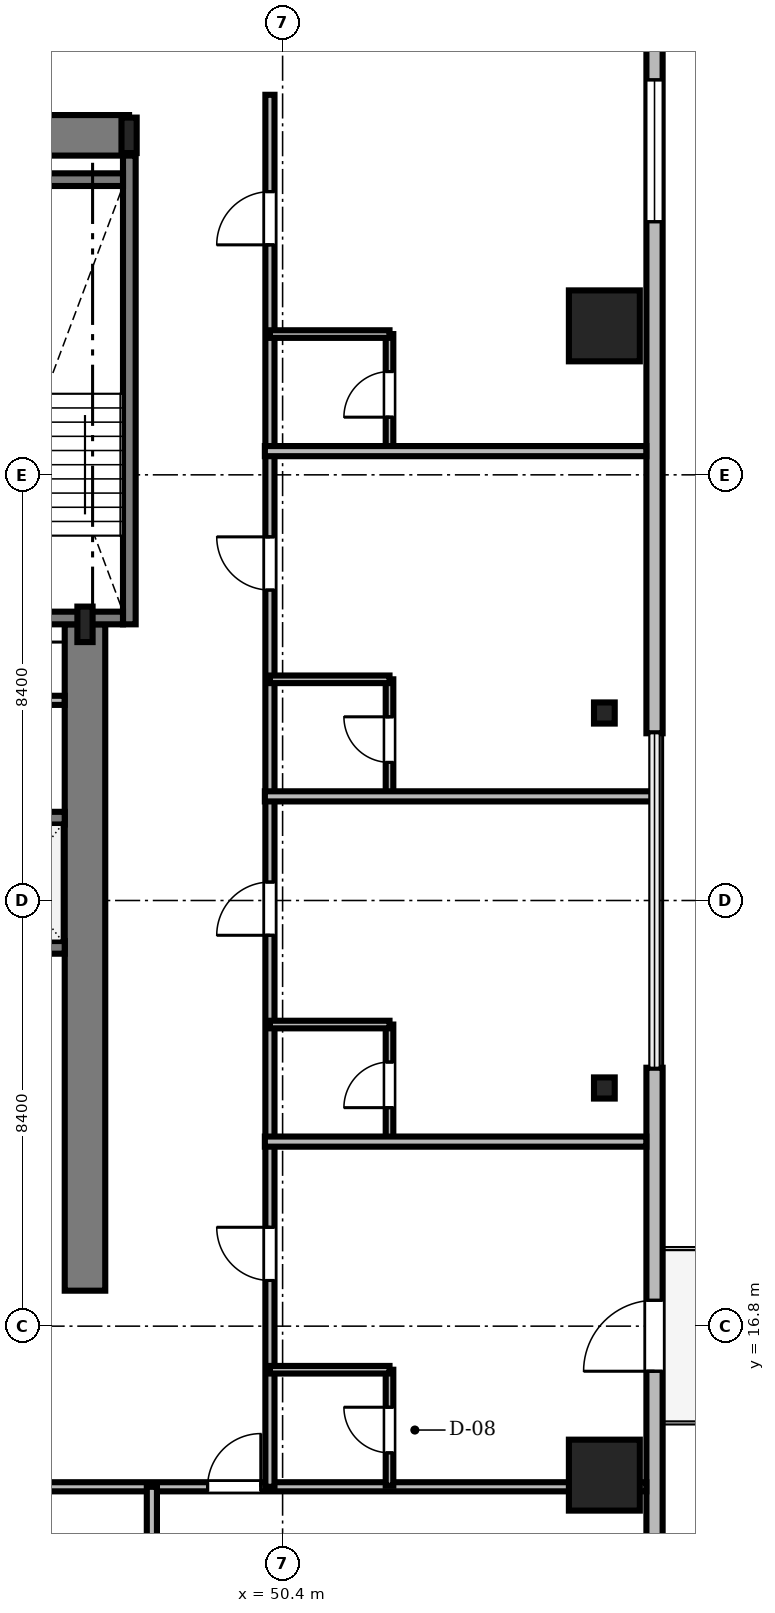
"""IFC4 building model, lengths in metres.
Left out: names, types, materials, properties, quantities, classifications, styles, units other than length and angle.
Written with IfcOpenShell. Run it as: python <this file> out.ifc"""

import sys

from ifc_helpers import new_model, si_unit, direction, frame, frame_2d, origin, origin_2d, place, context, subcontext, project, spatial, rectangle, i_section, extrude, source, transform, mapped, element, fill, save


model = new_model("IFC4")
c1 = context("Model", 3, precision=1e-05, world=origin(), true_north=direction((0.0, 1.0)))
c2 = subcontext(c1, "Body", "Model", "MODEL_VIEW")
j1 = project(units=[si_unit("LENGTHUNIT", "METRE"), si_unit("PLANEANGLEUNIT", "RADIAN")], contexts=[c1])
p1 = place(None, origin())
s1 = spatial("IfcSite", under=j1, at=p1, CompositionType="ELEMENT")
p2 = place(p1, origin())
s2 = spatial("IfcBuilding", under=s1, at=p2, CompositionType="ELEMENT")
p3 = place(p2, frame((0.0, 0.0, 226.05)))
s3 = spatial("IfcBuildingStorey", under=s2, at=p3, CompositionType="ELEMENT", Elevation=226.05)
m1 = source(origin(), c2, "Body", "SweptSolid", [
    extrude(rectangle(XDim=17.52, YDim=0.8, at=frame_2d((8.76, 0.0))), origin(), (0.0, 0.0, 1.0), 3.53),
])
p4 = place(p3, frame((29.85, 40.3, 0.0), z_axis=(0.0, 0.0, 1.0), x_axis=(1.0, 0.0, 0.0)))
e1 = element("IfcWall", 1, at=p4, inside=s3, PredefinedType="SHEAR", context=c2, shape_type="MappedRepresentation", body=[
    mapped(m1, transform((0.0, 0.0, 0.0), scale=1.0)),
])
m2 = source(origin(), c2, "Body", "SweptSolid", [
    extrude(rectangle(XDim=13.15, YDim=0.8, at=frame_2d((6.575, 0.0))), origin(), (0.0, 0.0, 1.0), 3.53),
])
p5 = place(p3, frame((46.5, 17.5, 0.0), z_axis=(0.0, 0.0, 1.0), x_axis=(0.0, 1.0, 0.0)))
e2 = element("IfcWall", 2, at=p5, inside=s3, PredefinedType="SHEAR", context=c2, shape_type="MappedRepresentation", body=[
    mapped(m2, transform((0.0, 0.0, 0.0), scale=1.0)),
])
m3 = source(origin(), c2, "Body", "SweptSolid", [
    extrude(i_section(OverallWidth=0.3, OverallDepth=0.7, WebThickness=0.017, FlangeThickness=0.032, FilletRadius=0.027, at=origin_2d()), origin(), (0.0, 0.0, 1.0), 3.53),
])
for number, where, z_axis, x_axis in (
    (3, (46.5, 30.65, 0.0), (0.0, 0.0, 1.0), (1.0, 0.0, 0.0)),
    (4, (47.37, 40.3, 0.0), (0.0, 0.0, 1.0), (1.0, 0.0, 0.0)),
):
    element("IfcColumn", number, at=place(p3, frame(where, z_axis=z_axis, x_axis=x_axis)), inside=s3, PredefinedType="COLUMN", context=c2, shape_type="MappedRepresentation", body=[
        mapped(m3, transform((0.0, 0.0, 0.0), scale=1.0)),
    ])
m4 = source(origin(), c2, "Body", "SweptSolid", [
    extrude(rectangle(XDim=1.4, YDim=1.4, at=origin_2d()), origin(), (0.0, 0.0, 1.0), 3.53),
])
for number, where, z_axis, x_axis in (
    (5, (56.75, 13.86, 0.0), (0.0, 0.0, 1.0), (1.0, 0.0, 0.0)),
    (6, (56.75, 36.54, 0.0), (0.0, 0.0, 1.0), (1.0, 0.0, 0.0)),
):
    element("IfcColumn", number, at=place(p3, frame(where, z_axis=z_axis, x_axis=x_axis)), inside=s3, PredefinedType="COLUMN", context=c2, shape_type="MappedRepresentation", body=[
        mapped(m4, transform((0.0, 0.0, 0.0), scale=1.0)),
    ])
m5 = source(origin(), c2, "Body", "SweptSolid", [
    extrude(i_section(OverallWidth=0.409, OverallDepth=0.417, WebThickness=0.021, FlangeThickness=0.033, FilletRadius=0.015, at=origin_2d()), origin(), (0.0, 0.0, 1.0), 3.53),
])
for number, where, z_axis, x_axis in (
    (7, (56.75, 21.5, 0.0), (0.0, 0.0, 1.0), (1.0, 0.0, 0.0)),
    (8, (56.75, 28.9, 0.0), (0.0, 0.0, 1.0), (1.0, 0.0, 0.0)),
):
    element("IfcColumn", number, at=place(p3, frame(where, z_axis=z_axis, x_axis=x_axis)), inside=s3, PredefinedType="COLUMN", context=c2, shape_type="MappedRepresentation", body=[
        mapped(m5, transform((0.0, 0.0, 0.0), scale=1.0)),
    ])
m6 = source(origin(), c2, "Body", "SweptSolid", [
    extrude(rectangle(XDim=15.6, YDim=0.32, at=frame_2d((7.8, 0.0))), origin(), (0.0, 0.0, 1.0), 3.53),
])
p6 = place(p3, frame((57.74, 6.3, 0.0), z_axis=(0.0, 0.0, 1.0), x_axis=(0.0, 1.0, 0.0)))
e9 = element("IfcWall", 9, at=p6, inside=s3, PredefinedType="SOLIDWALL", context=c2, shape_type="MappedRepresentation", body=[
    mapped(m6, transform((0.0, 0.0, 0.0), scale=1.0)),
])
m7 = source(origin(), c2, "Body", "SweptSolid", [
    extrude(rectangle(XDim=1.4, YDim=2.3, at=frame_2d((0.7, 1.15))), frame((0.0, 0.17, 0.0), z_axis=(0.0, -1.0, 0.0), x_axis=(1.0, 0.0, 0.0)), (0.0, 0.0, 1.0), 0.34),
])
p7 = place(p6, frame((9.61, 0.0, 0.0)))
e10 = element("IfcOpeningElement", 10, at=p7, cuts=e9, PredefinedType="OPENING", context=c2, shape_type="MappedRepresentation", body=[
    mapped(m7, transform((0.0, 0.0, 0.0), scale=1.0)),
])
m8 = source(origin(), c2, "Body", "SweptSolid", [
    extrude(rectangle(XDim=2.8, YDim=2.4, at=frame_2d((1.4, 1.2))), frame((0.0, 0.17, 0.0), z_axis=(0.0, -1.0, 0.0), x_axis=(1.0, 0.0, 0.0)), (0.0, 0.0, 1.0), 0.34),
])
p8 = place(p6, frame((2.705, 0.0, 0.72)))
e11 = element("IfcOpeningElement", 11, at=p8, cuts=e9, PredefinedType="OPENING", context=c2, shape_type="MappedRepresentation", body=[
    mapped(m8, transform((0.0, 0.0, 0.0), scale=1.0)),
])
m9 = source(origin(), c2, "Body", "SweptSolid", [
    extrude(rectangle(XDim=15.6, YDim=0.32, at=frame_2d((7.8, 0.0))), origin(), (0.0, 0.0, 1.0), 3.53),
])
p9 = place(p3, frame((57.74, 28.5, 0.0), z_axis=(0.0, 0.0, 1.0), x_axis=(0.0, 1.0, 0.0)))
e12 = element("IfcWall", 12, at=p9, inside=s3, PredefinedType="SOLIDWALL", context=c2, shape_type="MappedRepresentation", body=[
    mapped(m9, transform((0.0, 0.0, 0.0), scale=1.0)),
])
p10 = place(p9, frame((10.095, 0.0, 0.72)))
e13 = element("IfcOpeningElement", 13, at=p10, cuts=e12, PredefinedType="OPENING", context=c2, shape_type="MappedRepresentation", body=[
    mapped(m8, transform((0.0, 0.0, 0.0), scale=1.0)),
])
m10 = source(origin(), c2, "Body", "SweptSolid", [
    extrude(rectangle(XDim=9.25, YDim=0.25, at=frame_2d((4.625, 0.0))), origin(), (0.0, 0.0, 1.0), 3.55),
])
p11 = place(p3, frame((47.375, 30.65, 0.0), z_axis=(0.0, 0.0, 1.0), x_axis=(0.0, 1.0, 0.0)))
e14 = element("IfcWall", 14, at=p11, inside=s3, PredefinedType="SOLIDWALL", context=c2, shape_type="MappedRepresentation", body=[
    mapped(m10, transform((0.0, 0.0, 0.0), scale=1.0)),
])
m11 = source(origin(), c2, "Body", "SweptSolid", [
    extrude(rectangle(XDim=3.15, YDim=0.25, at=frame_2d((1.575, 0.0))), origin(), (0.0, 0.0, 1.0), 3.55),
])
p12 = place(p3, frame((44.1, 39.425, 0.0), z_axis=(0.0, 0.0, 1.0), x_axis=(1.0, 0.0, 0.0)))
e15 = element("IfcWall", 15, at=p12, inside=s3, PredefinedType="SOLIDWALL", context=c2, shape_type="MappedRepresentation", body=[
    mapped(m11, transform((0.0, 0.0, 0.0), scale=1.0)),
])
p13 = place(p3, frame((44.1, 30.775, 0.0), z_axis=(0.0, 0.0, 1.0), x_axis=(1.0, 0.0, 0.0)))
e16 = element("IfcWall", 16, at=p13, inside=s3, PredefinedType="SOLIDWALL", context=c2, shape_type="MappedRepresentation", body=[
    mapped(m11, transform((0.0, 0.0, 0.0), scale=1.0)),
])
m12 = source(origin(), c2, "Body", "SweptSolid", [
    extrude(rectangle(XDim=1.1, YDim=2.2, at=frame_2d((0.55, 1.1))), frame((0.0, 0.135, 0.0), z_axis=(0.0, -1.0, 0.0), x_axis=(1.0, 0.0, 0.0)), (0.0, 0.0, 1.0), 0.27),
])
p14 = place(p13, frame((0.35, 0.0, 0.0)))
e17 = element("IfcOpeningElement", 17, at=p14, cuts=e16, PredefinedType="OPENING", context=c2, shape_type="MappedRepresentation", body=[
    mapped(m12, transform((0.0, 0.0, 0.0), scale=1.0)),
])
m13 = source(origin(), c2, "Body", "SweptSolid", [
    extrude(rectangle(XDim=2.1, YDim=0.25, at=frame_2d((1.05, 0.0))), origin(), (0.0, 0.0, 1.0), 3.53),
])
p15 = place(p3, frame((44.0, 24.275, 0.0), z_axis=(0.0, 0.0, 1.0), x_axis=(1.0, 0.0, 0.0)))
e18 = element("IfcWall", 18, at=p15, inside=s3, PredefinedType="SOLIDWALL", context=c2, shape_type="MappedRepresentation", body=[
    mapped(m13, transform((0.0, 0.0, 0.0), scale=1.0)),
])
p16 = place(p3, frame((44.0, 26.825, 0.0), z_axis=(0.0, 0.0, 1.0), x_axis=(1.0, 0.0, 0.0)))
e19 = element("IfcWall", 19, at=p16, inside=s3, PredefinedType="SOLIDWALL", context=c2, shape_type="MappedRepresentation", body=[
    mapped(m13, transform((0.0, 0.0, 0.0), scale=1.0)),
])
m14 = source(origin(), c2, "Body", "SweptSolid", [
    extrude(rectangle(XDim=1.3, YDim=2.3, at=frame_2d((0.65, 1.15))), frame((0.0, 0.135, 0.0), z_axis=(0.0, -1.0, 0.0), x_axis=(1.0, 0.0, 0.0)), (0.0, 0.0, 1.0), 0.27),
])
p17 = place(p16, frame((0.4, 0.0, 0.0)))
e20 = element("IfcOpeningElement", 20, at=p17, cuts=e19, PredefinedType="OPENING", context=c2, shape_type="MappedRepresentation", body=[
    mapped(m14, transform((0.0, 0.0, 0.0), scale=1.0)),
])
m15 = source(origin(), c2, "Body", "SweptSolid", [
    extrude(rectangle(XDim=46.156, YDim=0.18, at=frame_2d((23.078, 0.0))), origin(), (0.0, 0.0, 1.0), 2.772),
])
p18 = place(p3, frame((11.422, 13.63, 0.0), z_axis=(0.0, 0.0, 1.0), x_axis=(1.0, 0.0, 0.0)))
e21 = element("IfcWall", 21, at=p18, inside=s3, PredefinedType="PARTITIONING", context=c2, shape_type="MappedRepresentation", body=[
    mapped(m15, transform((0.0, 0.0, 0.0), scale=1.0)),
])
m16 = source(origin(), c2, "Body", "SweptSolid", [
    extrude(rectangle(XDim=1.05, YDim=2.2, at=frame_2d((0.525, 1.1))), frame((0.0, 0.1, 0.0), z_axis=(0.0, -1.0, 0.0), x_axis=(1.0, 0.0, 0.0)), (0.0, 0.0, 1.0), 0.2),
])
p19 = place(p18, frame((14.338, 0.0, 0.0)))
e22 = element("IfcOpeningElement", 22, at=p19, cuts=e21, PredefinedType="OPENING", context=c2, shape_type="MappedRepresentation", body=[
    mapped(m16, transform((0.0, 0.0, 0.0), scale=1.0)),
])
p20 = place(p18, frame((17.059, 0.0, 0.0)))
e23 = element("IfcOpeningElement", 23, at=p20, cuts=e21, PredefinedType="OPENING", context=c2, shape_type="MappedRepresentation", body=[
    mapped(m16, transform((0.0, 0.0, 0.0), scale=1.0)),
])
p21 = place(p18, frame((21.772, 0.0, 0.0)))
e24 = element("IfcOpeningElement", 24, at=p21, cuts=e21, PredefinedType="OPENING", context=c2, shape_type="MappedRepresentation", body=[
    mapped(m16, transform((0.0, 0.0, 0.0), scale=1.0)),
])
p22 = place(p18, frame((27.414, 0.0, 0.0)))
e25 = element("IfcOpeningElement", 25, at=p22, cuts=e21, PredefinedType="OPENING", context=c2, shape_type="MappedRepresentation", body=[
    mapped(m16, transform((0.0, 0.0, 0.0), scale=1.0)),
])
p23 = place(p18, frame((33.057, 0.0, 0.0)))
e26 = element("IfcOpeningElement", 26, at=p23, cuts=e21, PredefinedType="OPENING", context=c2, shape_type="MappedRepresentation", body=[
    mapped(m16, transform((0.0, 0.0, 0.0), scale=1.0)),
])
p24 = place(p18, frame((37.498, 0.0, 0.0)))
e27 = element("IfcOpeningElement", 27, at=p24, cuts=e21, PredefinedType="OPENING", context=c2, shape_type="MappedRepresentation", body=[
    mapped(m16, transform((0.0, 0.0, 0.0), scale=1.0)),
])
m17 = source(origin(), c2, "Body", "SweptSolid", [
    extrude(rectangle(XDim=27.47, YDim=0.18, at=frame_2d((13.735, 0.0))), origin(), (0.0, 0.0, 1.0), 2.972),
])
p25 = place(p3, frame((50.15, 13.63, 0.0), z_axis=(0.0, 0.0, 1.0), x_axis=(0.0, 1.0, 0.0)))
e28 = element("IfcWall", 28, at=p25, inside=s3, PredefinedType="PARTITIONING", context=c2, shape_type="MappedRepresentation", body=[
    mapped(m17, transform((0.0, 0.0, 0.0), scale=1.0)),
])
p26 = place(p25, frame((4.071, 0.0, 0.0)))
e29 = element("IfcOpeningElement", 29, at=p26, cuts=e28, PredefinedType="OPENING", context=c2, shape_type="MappedRepresentation", body=[
    mapped(m16, transform((0.0, 0.0, 0.0), scale=1.0)),
])
p27 = place(p25, frame((10.884, 0.0, 0.0)))
e30 = element("IfcOpeningElement", 30, at=p27, cuts=e28, PredefinedType="OPENING", context=c2, shape_type="MappedRepresentation", body=[
    mapped(m16, transform((0.0, 0.0, 0.0), scale=1.0)),
])
p28 = place(p25, frame((17.696, 0.0, 0.0)))
e31 = element("IfcOpeningElement", 31, at=p28, cuts=e28, PredefinedType="OPENING", context=c2, shape_type="MappedRepresentation", body=[
    mapped(m16, transform((0.0, 0.0, 0.0), scale=1.0)),
])
p29 = place(p25, frame((24.509, 0.0, 0.0)))
e32 = element("IfcOpeningElement", 32, at=p29, cuts=e28, PredefinedType="OPENING", context=c2, shape_type="MappedRepresentation", body=[
    mapped(m16, transform((0.0, 0.0, 0.0), scale=1.0)),
])
m18 = source(origin(), c2, "Body", "SweptSolid", [
    extrude(rectangle(XDim=4.548, YDim=0.18, at=frame_2d((2.274, 0.0))), origin(), (0.0, 0.0, 1.0), 3.162),
])
p30 = place(p3, frame((41.55, 29.15, 0.0), z_axis=(0.0, 0.0, 1.0), x_axis=(1.0, 0.0, 0.0)))
e33 = element("IfcWall", 33, at=p30, inside=s3, PredefinedType="PARTITIONING", context=c2, shape_type="MappedRepresentation", body=[
    mapped(m18, transform((0.0, 0.0, 0.0), scale=1.0)),
])
m19 = source(origin(), c2, "Body", "SweptSolid", [
    extrude(rectangle(XDim=1.2, YDim=2.2, at=frame_2d((0.6, 1.1))), frame((0.0, 0.1, 0.0), z_axis=(0.0, -1.0, 0.0), x_axis=(1.0, 0.0, 0.0)), (0.0, 0.0, 1.0), 0.2),
])
p31 = place(p30, frame((1.6, 0.0, 0.0)))
e34 = element("IfcOpeningElement", 34, at=p31, cuts=e33, PredefinedType="OPENING", context=c2, shape_type="MappedRepresentation", body=[
    mapped(m19, transform((0.0, 0.0, 0.0), scale=1.0)),
])
m20 = source(origin(), c2, "Body", "SweptSolid", [
    extrude(rectangle(XDim=2.29, YDim=0.15, at=frame_2d((1.145, 0.0))), origin(), (0.0, 0.0, 1.0), 2.972),
])
p32 = place(p3, frame((52.51, 13.65, 0.0), z_axis=(0.0, 0.0, 1.0), x_axis=(0.0, 1.0, 0.0)))
e35 = element("IfcWall", 35, at=p32, inside=s3, PredefinedType="PARTITIONING", context=c2, shape_type="MappedRepresentation", body=[
    mapped(m20, transform((0.0, 0.0, 0.0), scale=1.0)),
])
m21 = source(origin(), c2, "Body", "SweptSolid", [
    extrude(rectangle(XDim=0.9, YDim=2.1, at=frame_2d((0.45, 1.05))), frame((0.0, 0.085, 0.0), z_axis=(0.0, -1.0, 0.0), x_axis=(1.0, 0.0, 0.0)), (0.0, 0.0, 1.0), 0.17),
])
p33 = place(p32, frame((0.65, 0.0, 0.0)))
e36 = element("IfcOpeningElement", 36, at=p33, cuts=e35, PredefinedType="OPENING", context=c2, shape_type="MappedRepresentation", body=[
    mapped(m21, transform((0.0, 0.0, 0.0), scale=1.0)),
])
m22 = source(origin(), c2, "Body", "SweptSolid", [
    extrude(rectangle(XDim=2.29, YDim=0.15, at=frame_2d((1.145, 0.0))), origin(), (0.0, 0.0, 1.0), 3.53),
])
p34 = place(p3, frame((52.51, 20.462, 0.0), z_axis=(0.0, 0.0, 1.0), x_axis=(0.0, 1.0, 0.0)))
e37 = element("IfcWall", 37, at=p34, inside=s3, PredefinedType="PARTITIONING", context=c2, shape_type="MappedRepresentation", body=[
    mapped(m22, transform((0.0, 0.0, 0.0), scale=1.0)),
])
p35 = place(p34, frame((0.65, 0.0, 0.0)))
e38 = element("IfcOpeningElement", 38, at=p35, cuts=e37, PredefinedType="OPENING", context=c2, shape_type="MappedRepresentation", body=[
    mapped(m21, transform((0.0, 0.0, 0.0), scale=1.0)),
])
p36 = place(p3, frame((52.51, 27.275, 0.0), z_axis=(0.0, 0.0, 1.0), x_axis=(0.0, 1.0, 0.0)))
e39 = element("IfcWall", 39, at=p36, inside=s3, PredefinedType="PARTITIONING", context=c2, shape_type="MappedRepresentation", body=[
    mapped(m20, transform((0.0, 0.0, 0.0), scale=1.0)),
])
p37 = place(p36, frame((0.65, 0.0, 0.0)))
e40 = element("IfcOpeningElement", 40, at=p37, cuts=e39, PredefinedType="OPENING", context=c2, shape_type="MappedRepresentation", body=[
    mapped(m21, transform((0.0, 0.0, 0.0), scale=1.0)),
])
p38 = place(p3, frame((52.51, 34.088, 0.0), z_axis=(0.0, 0.0, 1.0), x_axis=(0.0, 1.0, 0.0)))
e41 = element("IfcWall", 41, at=p38, inside=s3, PredefinedType="PARTITIONING", context=c2, shape_type="MappedRepresentation", body=[
    mapped(m22, transform((0.0, 0.0, 0.0), scale=1.0)),
])
p39 = place(p38, frame((0.65, 0.0, 0.0)))
e42 = element("IfcOpeningElement", 42, at=p39, cuts=e41, PredefinedType="OPENING", context=c2, shape_type="MappedRepresentation", body=[
    mapped(m21, transform((0.0, 0.0, 0.0), scale=1.0)),
])
m23 = source(origin(), c2, "Body", "SweptSolid", [
    extrude(rectangle(XDim=11.508, YDim=0.2, at=frame_2d((5.754, 0.0))), origin(), (0.0, 0.0, 1.0), 2.772),
])
p40 = place(p3, frame((47.82, 2.122, 0.0), z_axis=(0.0, 0.0, 1.0), x_axis=(0.0, 1.0, 0.0)))
e43 = element("IfcWall", 43, at=p40, inside=s3, PredefinedType="PARTITIONING", context=c2, shape_type="MappedRepresentation", body=[
    mapped(m23, transform((0.0, 0.0, 0.0), scale=1.0)),
])
m24 = source(origin(), c2, "Body", "SweptSolid", [
    extrude(rectangle(XDim=7.528, YDim=0.2, at=frame_2d((3.764, 0.0))), origin(), (0.0, 0.0, 1.0), 2.772),
])
p41 = place(p3, frame((50.05, 20.442, 0.0), z_axis=(0.0, 0.0, 1.0), x_axis=(1.0, 0.0, 0.0)))
e44 = element("IfcWall", 44, at=p41, inside=s3, PredefinedType="PARTITIONING", context=c2, shape_type="MappedRepresentation", body=[
    mapped(m24, transform((0.0, 0.0, 0.0), scale=1.0)),
])
m25 = source(origin(), c2, "Body", "SweptSolid", [
    extrude(rectangle(XDim=7.72, YDim=0.2, at=frame_2d((3.86, 0.0))), origin(), (0.0, 0.0, 1.0), 2.772),
])
p42 = place(p3, frame((50.05, 27.255, 0.0), z_axis=(0.0, 0.0, 1.0), x_axis=(1.0, 0.0, 0.0)))
e45 = element("IfcWall", 45, at=p42, inside=s3, PredefinedType="PARTITIONING", context=c2, shape_type="MappedRepresentation", body=[
    mapped(m25, transform((0.0, 0.0, 0.0), scale=1.0)),
])
p43 = place(p3, frame((50.05, 34.068, 0.0), z_axis=(0.0, 0.0, 1.0), x_axis=(1.0, 0.0, 0.0)))
e46 = element("IfcWall", 46, at=p43, inside=s3, PredefinedType="PARTITIONING", context=c2, shape_type="MappedRepresentation", body=[
    mapped(m24, transform((0.0, 0.0, 0.0), scale=1.0)),
])
m26 = source(origin(), c2, "Body", "SweptSolid", [
    extrude(rectangle(XDim=2.36, YDim=0.15, at=frame_2d((1.18, 0.0))), origin(), (0.0, 0.0, 1.0), 3.53),
])
for number, where, z_axis, x_axis in (
    (47, (50.15, 15.94, 0.0), (0.0, 0.0, 1.0), (1.0, 0.0, 0.0)),
    (48, (50.15, 22.752, 0.0), (0.0, 0.0, 1.0), (1.0, 0.0, 0.0)),
    (49, (50.15, 29.565, 0.0), (0.0, 0.0, 1.0), (1.0, 0.0, 0.0)),
    (50, (50.15, 36.378, 0.0), (0.0, 0.0, 1.0), (1.0, 0.0, 0.0)),
):
    element("IfcWall", number, at=place(p3, frame(where, z_axis=z_axis, x_axis=x_axis)), inside=s3, PredefinedType="PARTITIONING", context=c2, shape_type="MappedRepresentation", body=[
        mapped(m26, transform((0.0, 0.0, 0.0), scale=1.0)),
    ])
m27 = source(origin(), c2, "Body", "SweptSolid", [
    extrude(rectangle(XDim=1.4, YDim=2.3, at=frame_2d((0.7, 1.15))), frame((0.0, 0.025, 0.0), z_axis=(0.0, -1.0, 0.0), x_axis=(1.0, 0.0, 0.0)), (0.0, 0.0, 1.0), 0.05),
])
p44 = place(p7, frame((1.4, 0.0, 0.0), z_axis=(0.0, 0.0, 1.0), x_axis=(-1.0, 0.0, 0.0)))
e51 = element("IfcDoor", 51, at=p44, inside=s3, OperationType="DOUBLE_DOOR_SLIDING", PredefinedType="DOOR", context=c2, shape_type="MappedRepresentation", body=[
    mapped(m27, transform((0.0, 0.0, 0.0), scale=1.0)),
])
fill(e10, e51)
m28 = source(origin(), c2, "Body", "SweptSolid", [
    extrude(rectangle(XDim=2.8, YDim=2.4, at=frame_2d((1.4, 1.2))), frame((0.0, 0.03, 0.0), z_axis=(0.0, -1.0, 0.0), x_axis=(1.0, 0.0, 0.0)), (0.0, 0.0, 1.0), 0.06),
])
p45 = place(p10, origin())
e52 = element("IfcWindow", 52, at=p45, inside=s3, PartitioningType="SINGLE_PANEL", PredefinedType="WINDOW", context=c2, shape_type="MappedRepresentation", body=[
    mapped(m28, transform((0.0, 0.0, 0.0), scale=1.0)),
])
fill(e13, e52)
m29 = source(origin(), c2, "Body", "SweptSolid", [
    extrude(rectangle(XDim=1.05, YDim=2.2, at=frame_2d((0.525, 1.1))), frame((0.0, 0.025, 0.0), z_axis=(0.0, -1.0, 0.0), x_axis=(1.0, 0.0, 0.0)), (0.0, 0.0, 1.0), 0.05),
])
p46 = place(p24, origin())
e53 = element("IfcDoor", 53, at=p46, inside=s3, OperationType="SINGLE_SWING_RIGHT", PredefinedType="DOOR", context=c2, shape_type="MappedRepresentation", body=[
    mapped(m29, transform((0.0, 0.0, 0.0), scale=1.0)),
])
fill(e27, e53)
p47 = place(p26, origin())
e54 = element("IfcDoor", 54, at=p47, inside=s3, OperationType="SINGLE_SWING_RIGHT", PredefinedType="DOOR", context=c2, shape_type="MappedRepresentation", body=[
    mapped(m29, transform((0.0, 0.0, 0.0), scale=1.0)),
])
fill(e29, e54)
p48 = place(p27, origin())
e55 = element("IfcDoor", 55, at=p48, inside=s3, OperationType="SINGLE_SWING_LEFT", PredefinedType="DOOR", context=c2, shape_type="MappedRepresentation", body=[
    mapped(m29, transform((0.0, 0.0, 0.0), scale=1.0)),
])
fill(e30, e55)
p49 = place(p28, origin())
e56 = element("IfcDoor", 56, at=p49, inside=s3, OperationType="SINGLE_SWING_RIGHT", PredefinedType="DOOR", context=c2, shape_type="MappedRepresentation", body=[
    mapped(m29, transform((0.0, 0.0, 0.0), scale=1.0)),
])
fill(e31, e56)
p50 = place(p29, origin())
e57 = element("IfcDoor", 57, at=p50, inside=s3, OperationType="SINGLE_SWING_LEFT", PredefinedType="DOOR", context=c2, shape_type="MappedRepresentation", body=[
    mapped(m29, transform((0.0, 0.0, 0.0), scale=1.0)),
])
fill(e32, e57)
m30 = source(origin(), c2, "Body", "SweptSolid", [
    extrude(rectangle(XDim=0.9, YDim=2.1, at=frame_2d((0.45, 1.05))), frame((0.0, 0.025, 0.0), z_axis=(0.0, -1.0, 0.0), x_axis=(1.0, 0.0, 0.0)), (0.0, 0.0, 1.0), 0.05),
])
p51 = place(p33, origin())
e58 = element("IfcDoor", 58, at=p51, inside=s3, OperationType="SINGLE_SWING_RIGHT", PredefinedType="DOOR", context=c2, shape_type="MappedRepresentation", body=[
    mapped(m30, transform((0.0, 0.0, 0.0), scale=1.0)),
])
fill(e36, e58)
p52 = place(p35, origin())
e59 = element("IfcDoor", 59, at=p52, inside=s3, OperationType="SINGLE_SWING_LEFT", PredefinedType="DOOR", context=c2, shape_type="MappedRepresentation", body=[
    mapped(m30, transform((0.0, 0.0, 0.0), scale=1.0)),
])
fill(e38, e59)
p53 = place(p37, origin())
e60 = element("IfcDoor", 60, at=p53, inside=s3, OperationType="SINGLE_SWING_RIGHT", PredefinedType="DOOR", context=c2, shape_type="MappedRepresentation", body=[
    mapped(m30, transform((0.0, 0.0, 0.0), scale=1.0)),
])
fill(e40, e60)
p54 = place(p39, origin())
e61 = element("IfcDoor", 61, at=p54, inside=s3, OperationType="SINGLE_SWING_LEFT", PredefinedType="DOOR", context=c2, shape_type="MappedRepresentation", body=[
    mapped(m30, transform((0.0, 0.0, 0.0), scale=1.0)),
])
fill(e42, e61)
save(model, sys.argv[1])
